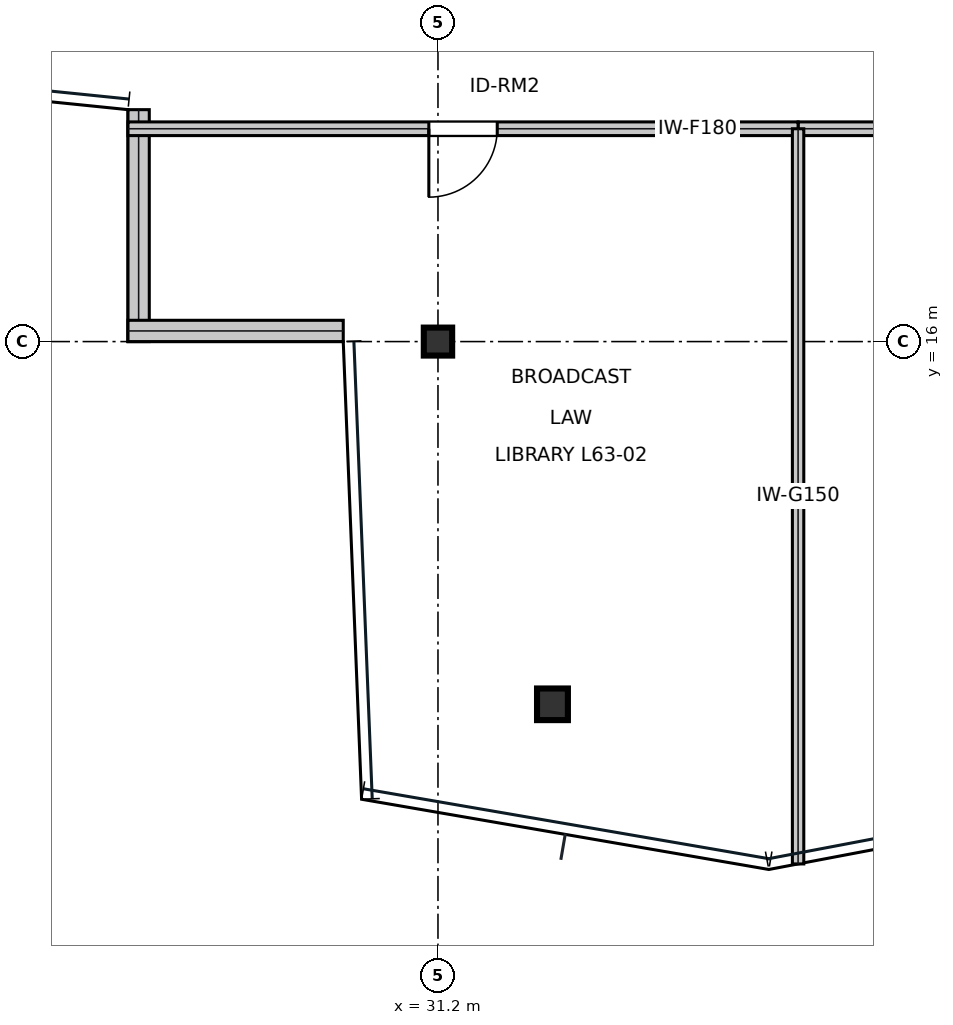
"""IFC4 building model, lengths in metres.
Left out: names, types, materials, properties, quantities, classifications, styles, units other than length and angle.
Written with IfcOpenShell. Run it as: python <this file> out.ifc"""

import sys

from ifc_helpers import new_model, si_unit, direction, frame, frame_2d, origin, origin_2d, place, context, subcontext, project, spatial, rectangle, i_section, extrude, element, fill, save


model = new_model("IFC4")
c1 = context("Model", 3, precision=1e-05, world=origin(), true_north=direction((0.0, 1.0)))
c2 = subcontext(c1, "Body", "Model", "MODEL_VIEW")
j1 = project(units=[si_unit("LENGTHUNIT", "METRE"), si_unit("PLANEANGLEUNIT", "RADIAN")], contexts=[c1])
p1 = place(None, origin())
s1 = spatial("IfcSite", under=j1, at=p1, CompositionType="ELEMENT")
p2 = place(p1, origin())
s2 = spatial("IfcBuilding", under=s1, at=p2, CompositionType="ELEMENT")
p3 = place(p2, frame((0.0, 0.0, 270.9)))
s3 = spatial("IfcBuildingStorey", under=s2, at=p3, CompositionType="ELEMENT", Elevation=270.9)
p4 = place(p3, frame((31.2, 16.0, 0.0), z_axis=(0.0, 0.0, 1.0), x_axis=(1.0, 0.0, 0.0)))
e1 = element("IfcColumn", 1, at=p4, inside=s3, PredefinedType="COLUMN", context=c2, shape_type="SweptSolid", body=[
    extrude(i_section(OverallWidth=0.373, OverallDepth=0.368, WebThickness=0.015, FlangeThickness=0.024, at=origin_2d()), origin(), (0.0, 0.0, 1.0), 4.044),
])
p5 = place(p3, frame((32.706, 11.228, 0.016), z_axis=(0.0, 0.0, 1.0), x_axis=(1.0, 0.0, 0.0)))
e2 = element("IfcColumn", 2, at=p5, inside=s3, PredefinedType="COLUMN", context=c2, shape_type="SweptSolid", body=[
    extrude(i_section(OverallWidth=0.406, OverallDepth=0.416, WebThickness=0.03, FlangeThickness=0.048, at=origin_2d()), origin(), (0.0, 0.0, 1.0), 4.018),
])
p6 = place(p3, frame((27.262, 19.051, 0.0), z_axis=(0.0, 0.0, 1.0), x_axis=(0.0, -1.0, 0.0)))
e3 = element("IfcWall", 3, at=p6, inside=s3, PredefinedType="STANDARD", context=c2, shape_type="SweptSolid", body=[
    extrude(rectangle(XDim=3.051, YDim=0.28, at=frame_2d((1.526, 0.0))), origin(), (0.0, 0.0, 1.0), 3.339),
])
p7 = place(p3, frame((27.122, 16.14, 0.0), z_axis=(0.0, 0.0, 1.0), x_axis=(1.0, 0.0, 0.0)))
e4 = element("IfcWall", 4, at=p7, inside=s3, PredefinedType="STANDARD", context=c2, shape_type="SweptSolid", body=[
    extrude(rectangle(XDim=2.832, YDim=0.28, at=frame_2d((1.416, 0.0))), origin(), (0.0, 0.0, 1.0), 3.81),
])
p8 = place(p3, frame((35.938, 18.8, 0.0), z_axis=(0.0, 0.0, 1.0), x_axis=(1.0, 0.0, 0.0)))
e5 = element("IfcWall", 5, at=p8, inside=s3, PredefinedType="SOLIDWALL", context=c2, shape_type="SweptSolid", body=[
    extrude(rectangle(XDim=3.012, YDim=0.18, at=frame_2d((1.506, 0.0))), origin(), (0.0, 0.0, 1.0), 3.81),
])
p9 = place(p8, frame((1.571, 0.0, 0.0)))
e6 = element("IfcOpeningElement", 6, at=p9, cuts=e5, PredefinedType="OPENING", context=c2, shape_type="SweptSolid", body=[
    extrude(rectangle(XDim=0.95, YDim=2.15, at=frame_2d((0.475, 1.075))), frame((0.0, 0.1, 0.0), z_axis=(0.0, -1.0, 0.0), x_axis=(1.0, 0.0, 0.0)), (0.0, 0.0, 1.0), 0.2),
])
p10 = place(p3, frame((27.122, 18.8, 0.0), z_axis=(0.0, 0.0, 1.0), x_axis=(1.0, 0.0, 0.0)))
e7 = element("IfcWall", 7, at=p10, inside=s3, PredefinedType="SOLIDWALL", context=c2, shape_type="SweptSolid", body=[
    extrude(rectangle(XDim=8.816, YDim=0.18, at=frame_2d((4.408, 0.0))), origin(), (0.0, 0.0, 1.0), 3.27),
])
p11 = place(p10, frame((3.958, 0.0, 0.0)))
e8 = element("IfcOpeningElement", 8, at=p11, cuts=e7, PredefinedType="OPENING", context=c2, shape_type="SweptSolid", body=[
    extrude(rectangle(XDim=0.9, YDim=2.15, at=frame_2d((0.45, 1.075))), frame((0.0, 0.1, 0.0), z_axis=(0.0, -1.0, 0.0), x_axis=(1.0, 0.0, 0.0)), (0.0, 0.0, 1.0), 0.2),
])
p12 = place(p3, frame((35.938, 9.128, 0.0), z_axis=(0.0, 0.0, 1.0), x_axis=(0.0, 1.0, 0.0)))
e9 = element("IfcWall", 9, at=p12, inside=s3, PredefinedType="MOVABLE", context=c2, shape_type="SweptSolid", body=[
    extrude(rectangle(XDim=9.672, YDim=0.15, at=frame_2d((4.836, 0.0))), origin(), (0.0, 0.0, 1.0), 3.27),
])
p13 = place(p11, frame((0.9, 0.0, 0.0), z_axis=(0.0, 0.0, 1.0), x_axis=(-1.0, 0.0, 0.0)))
e10 = element("IfcDoor", 10, at=p13, inside=s3, OperationType="SINGLE_SWING_RIGHT", PredefinedType="DOOR", context=c2, shape_type="SweptSolid", body=[
    extrude(rectangle(XDim=0.9, YDim=2.15, at=frame_2d((0.45, 1.075))), frame((0.0, 0.025, 0.0), z_axis=(0.0, -1.0, 0.0), x_axis=(1.0, 0.0, 0.0)), (0.0, 0.0, 1.0), 0.05),
])
fill(e8, e10)
save(model, sys.argv[1])
